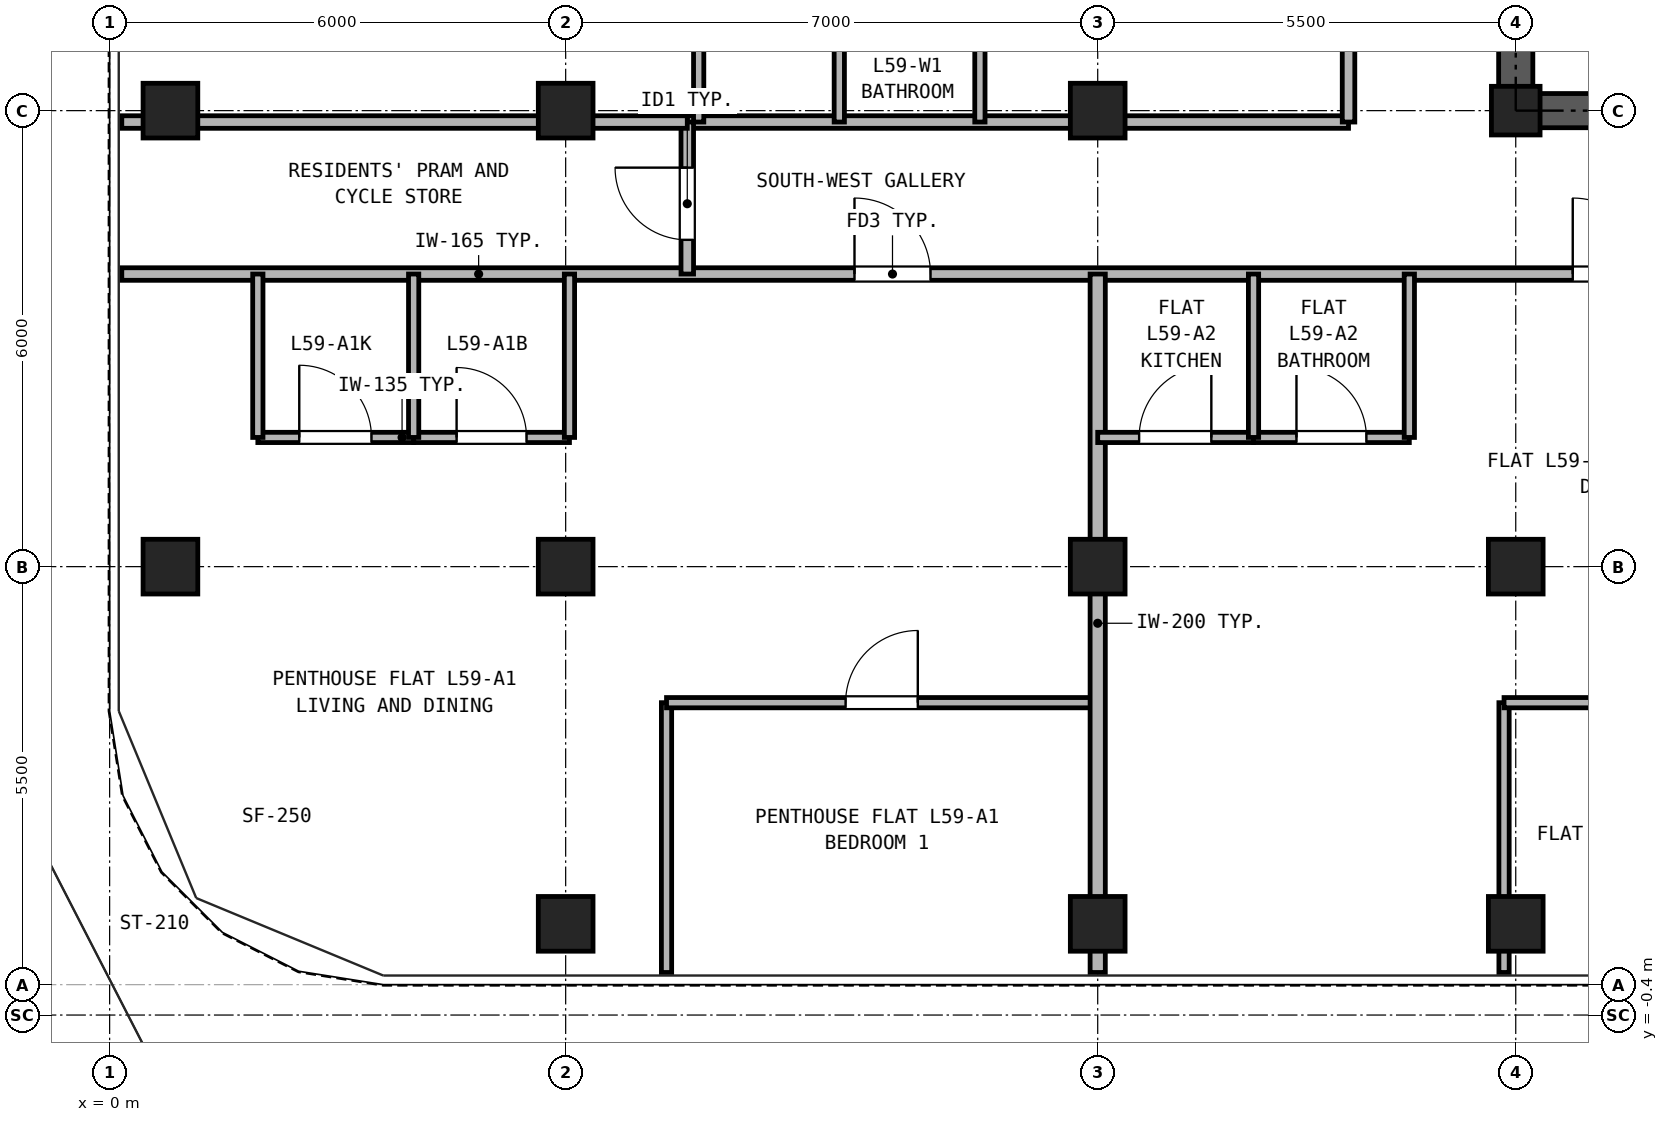
"""IFC4 building model, lengths in metres.
Left out: names, types, materials, properties, quantities, classifications, styles, units other than length and angle.
Written with IfcOpenShell. Run it as: python <this file> out.ifc"""

import sys

from ifc_helpers import new_model, si_unit, direction, frame, frame_2d, origin, origin_2d, place, context, subcontext, project, spatial, rectangle, hollow_rectangle, extrude, source, transform, mapped, element, fill, save


model = new_model("IFC4")
c1 = context("Model", 3, precision=1e-05, world=origin(), true_north=direction((0.0, 1.0)))
c2 = subcontext(c1, "Body", "Model", "MODEL_VIEW")
j1 = project(units=[si_unit("LENGTHUNIT", "METRE"), si_unit("PLANEANGLEUNIT", "RADIAN")], contexts=[c1])
p1 = place(None, origin())
s1 = spatial("IfcSite", under=j1, at=p1, CompositionType="ELEMENT")
p2 = place(p1, origin())
s2 = spatial("IfcBuilding", under=s1, at=p2, CompositionType="ELEMENT")
p3 = place(p2, frame((0.0, 0.0, 209.2)))
s3 = spatial("IfcBuildingStorey", under=s2, at=p3, CompositionType="ELEMENT", Elevation=209.2)
m1 = source(origin(), c2, "Body", "SweptSolid", [
    extrude(hollow_rectangle(XDim=0.72, YDim=0.72, WallThickness=0.04, at=origin_2d()), origin(), (0.0, 0.0, 1.0), 2.95),
])
for number, where, z_axis, x_axis in (
    (1, (6.0, 0.8, 0.0), (0.0, 0.0, 1.0), (1.0, 0.0, 0.0)),
    (2, (13.0, 0.8, 0.0), (0.0, 0.0, 1.0), (1.0, 0.0, 0.0)),
    (3, (18.5, 0.8, 0.0), (0.0, 0.0, 1.0), (1.0, 0.0, 0.0)),
    (4, (0.8, 5.5, 0.0), (0.0, 0.0, 1.0), (1.0, 0.0, 0.0)),
    (5, (0.8, 11.5, 0.0), (0.0, 0.0, 1.0), (1.0, 0.0, 0.0)),
    (6, (6.0, 5.5, 0.0), (0.0, 0.0, 1.0), (1.0, 0.0, 0.0)),
    (7, (6.0, 11.5, 0.0), (0.0, 0.0, 1.0), (1.0, 0.0, 0.0)),
    (8, (13.0, 5.5, 0.0), (0.0, 0.0, 1.0), (1.0, 0.0, 0.0)),
    (9, (13.0, 11.5, 0.0), (0.0, 0.0, 1.0), (1.0, 0.0, 0.0)),
    (10, (18.5, 5.5, 0.0), (0.0, 0.0, 1.0), (1.0, 0.0, 0.0)),
):
    element("IfcColumn", number, at=place(p3, frame(where, z_axis=z_axis, x_axis=x_axis)), inside=s3, PredefinedType="COLUMN", context=c2, shape_type="MappedRepresentation", body=[
        mapped(m1, transform((0.0, 0.0, 0.0), x_axis=(1.0, 0.0, 0.0), y_axis=(0.0, 1.0, 0.0), z_axis=(0.0, 0.0, 1.0), scale=1.0)),
    ])
m2 = source(origin(), c2, "Body", "SweptSolid", [
    extrude(hollow_rectangle(XDim=0.64, YDim=0.64, WallThickness=0.035, at=origin_2d()), origin(), (0.0, 0.0, 1.0), 2.95),
])
p4 = place(p3, frame((18.5, 11.5, 0.0), z_axis=(0.0, 0.0, 1.0), x_axis=(1.0, 0.0, 0.0)))
e11 = element("IfcColumn", 11, at=p4, inside=s3, PredefinedType="COLUMN", context=c2, shape_type="MappedRepresentation", body=[
    mapped(m2, transform((0.0, 0.0, 0.0), x_axis=(1.0, 0.0, 0.0), y_axis=(0.0, 1.0, 0.0), z_axis=(0.0, 0.0, 1.0), scale=1.0)),
])
p5 = place(p3, frame((18.275, 11.5, 0.0), z_axis=(0.0, 0.0, 1.0), x_axis=(1.0, 0.0, 0.0)))
e12 = element("IfcWall", 12, at=p5, inside=s3, PredefinedType="SHEAR", context=c2, shape_type="SweptSolid", body=[
    extrude(rectangle(XDim=10.45, YDim=0.45, at=frame_2d((5.225, 0.0))), origin(), (0.0, 0.0, 1.0), 2.95),
])
p6 = place(p5, frame((1.825, 0.0, 0.0)))
e13 = element("IfcOpeningElement", 13, at=p6, cuts=e12, PredefinedType="OPENING", context=c2, shape_type="SweptSolid", body=[
    extrude(rectangle(XDim=0.95, YDim=2.15, at=frame_2d((0.475, 1.075))), frame((0.0, 0.235, 0.0), z_axis=(0.0, -1.0, 0.0), x_axis=(1.0, 0.0, 0.0)), (0.0, 0.0, 1.0), 0.47),
])
p7 = place(p5, frame((5.325, 0.0, 0.0)))
e14 = element("IfcOpeningElement", 14, at=p7, cuts=e12, PredefinedType="OPENING", context=c2, shape_type="SweptSolid", body=[
    extrude(rectangle(XDim=0.95, YDim=2.15, at=frame_2d((0.475, 1.075))), frame((0.0, 0.235, 0.0), z_axis=(0.0, -1.0, 0.0), x_axis=(1.0, 0.0, 0.0)), (0.0, 0.0, 1.0), 0.47),
])
p8 = place(p5, frame((8.225, 0.0, 0.0)))
e15 = element("IfcOpeningElement", 15, at=p8, cuts=e12, PredefinedType="OPENING", context=c2, shape_type="SweptSolid", body=[
    extrude(rectangle(XDim=1.1, YDim=2.25, at=frame_2d((0.55, 1.125))), frame((0.0, 0.235, 0.0), z_axis=(0.0, -1.0, 0.0), x_axis=(1.0, 0.0, 0.0)), (0.0, 0.0, 1.0), 0.47),
])
p9 = place(p3, frame((18.5, 11.725, 0.0), z_axis=(0.0, 0.0, 1.0), x_axis=(0.0, 1.0, 0.0)))
e16 = element("IfcWall", 16, at=p9, inside=s3, PredefinedType="SHEAR", context=c2, shape_type="SweptSolid", body=[
    extrude(rectangle(XDim=16.8, YDim=0.45, at=frame_2d((8.4, 0.0))), origin(), (0.0, 0.0, 1.0), 2.95),
])
p10 = place(p9, frame((7.425, 0.0, 0.0)))
e17 = element("IfcOpeningElement", 17, at=p10, cuts=e16, PredefinedType="OPENING", context=c2, shape_type="SweptSolid", body=[
    extrude(rectangle(XDim=1.15, YDim=2.2, at=frame_2d((0.575, 1.1))), frame((0.0, 0.235, 0.0), z_axis=(0.0, -1.0, 0.0), x_axis=(1.0, 0.0, 0.0)), (0.0, 0.0, 1.0), 0.47),
])
p11 = place(p3, frame((0.16, 9.35, 0.0), z_axis=(0.0, 0.0, 1.0), x_axis=(1.0, 0.0, 0.0)))
e18 = element("IfcWall", 18, at=p11, inside=s3, PredefinedType="PARTITIONING", context=c2, shape_type="SweptSolid", body=[
    extrude(rectangle(XDim=41.48, YDim=0.165, at=frame_2d((20.74, 0.0))), origin(), (0.0, 0.0, 1.0), 2.95),
])
p12 = place(p11, frame((9.64, 0.0, 0.0)))
e19 = element("IfcOpeningElement", 19, at=p12, cuts=e18, PredefinedType="OPENING", context=c2, shape_type="SweptSolid", body=[
    extrude(rectangle(XDim=1.0, YDim=2.15, at=frame_2d((0.5, 1.075))), frame((0.0, 0.093, 0.0), z_axis=(0.0, -1.0, 0.0), x_axis=(1.0, 0.0, 0.0)), (0.0, 0.0, 1.0), 0.185),
])
p13 = place(p11, frame((19.09, 0.0, 0.0)))
e20 = element("IfcOpeningElement", 20, at=p13, cuts=e18, PredefinedType="OPENING", context=c2, shape_type="SweptSolid", body=[
    extrude(rectangle(XDim=1.0, YDim=2.15, at=frame_2d((0.5, 1.075))), frame((0.0, 0.093, 0.0), z_axis=(0.0, -1.0, 0.0), x_axis=(1.0, 0.0, 0.0)), (0.0, 0.0, 1.0), 0.185),
])
p14 = place(p11, frame((28.34, 0.0, 0.0)))
e21 = element("IfcOpeningElement", 21, at=p14, cuts=e18, PredefinedType="OPENING", context=c2, shape_type="SweptSolid", body=[
    extrude(rectangle(XDim=1.0, YDim=2.15, at=frame_2d((0.5, 1.075))), frame((0.0, 0.093, 0.0), z_axis=(0.0, -1.0, 0.0), x_axis=(1.0, 0.0, 0.0)), (0.0, 0.0, 1.0), 0.185),
])
p15 = place(p11, frame((32.865, 0.0, 0.0)))
e22 = element("IfcOpeningElement", 22, at=p15, cuts=e18, PredefinedType="OPENING", context=c2, shape_type="SweptSolid", body=[
    extrude(rectangle(XDim=1.0, YDim=2.15, at=frame_2d((0.5, 1.075))), frame((0.0, 0.093, 0.0), z_axis=(0.0, -1.0, 0.0), x_axis=(1.0, 0.0, 0.0)), (0.0, 0.0, 1.0), 0.185),
])
p16 = place(p3, frame((7.6, 11.35, 0.0), z_axis=(0.0, 0.0, 1.0), x_axis=(1.0, 0.0, 0.0)))
e23 = element("IfcWall", 23, at=p16, inside=s3, PredefinedType="PARTITIONING", context=c2, shape_type="SweptSolid", body=[
    extrude(rectangle(XDim=8.7, YDim=0.165, at=frame_2d((4.35, 0.0))), origin(), (0.0, 0.0, 1.0), 2.323),
])
p17 = place(p3, frame((7.6, 9.35, 0.0), z_axis=(0.0, 0.0, 1.0), x_axis=(0.0, 1.0, 0.0)))
e24 = element("IfcWall", 24, at=p17, inside=s3, PredefinedType="PARTITIONING", context=c2, shape_type="SweptSolid", body=[
    extrude(rectangle(XDim=2.0, YDim=0.165, at=frame_2d((1.0, 0.0))), origin(), (0.0, 0.0, 1.0), 2.95),
])
p18 = place(p17, frame((0.45, 0.0, 0.0)))
e25 = element("IfcOpeningElement", 25, at=p18, cuts=e24, PredefinedType="OPENING", context=c2, shape_type="SweptSolid", body=[
    extrude(rectangle(XDim=0.95, YDim=2.15, at=frame_2d((0.475, 1.075))), frame((0.0, 0.093, 0.0), z_axis=(0.0, -1.0, 0.0), x_axis=(1.0, 0.0, 0.0)), (0.0, 0.0, 1.0), 0.185),
])
p19 = place(p3, frame((16.3, 11.35, 0.0), z_axis=(0.0, 0.0, 1.0), x_axis=(0.0, 1.0, 0.0)))
e26 = element("IfcWall", 26, at=p19, inside=s3, PredefinedType="PARTITIONING", context=c2, shape_type="SweptSolid", body=[
    extrude(rectangle(XDim=23.79, YDim=0.165, at=frame_2d((11.895, 0.0))), origin(), (0.0, 0.0, 1.0), 2.95),
])
p20 = place(p19, frame((4.825, 0.0, 0.0)))
e27 = element("IfcOpeningElement", 27, at=p20, cuts=e26, PredefinedType="OPENING", context=c2, shape_type="SweptSolid", body=[
    extrude(rectangle(XDim=1.0, YDim=2.15, at=frame_2d((0.5, 1.075))), frame((0.0, 0.093, 0.0), z_axis=(0.0, -1.0, 0.0), x_axis=(1.0, 0.0, 0.0)), (0.0, 0.0, 1.0), 0.185),
])
p21 = place(p19, frame((14.475, 0.0, 0.0)))
e28 = element("IfcOpeningElement", 28, at=p21, cuts=e26, PredefinedType="OPENING", context=c2, shape_type="SweptSolid", body=[
    extrude(rectangle(XDim=1.0, YDim=2.15, at=frame_2d((0.5, 1.075))), frame((0.0, 0.093, 0.0), z_axis=(0.0, -1.0, 0.0), x_axis=(1.0, 0.0, 0.0)), (0.0, 0.0, 1.0), 0.185),
])
p22 = place(p3, frame((1.95, 7.2, 0.0), z_axis=(0.0, 0.0, 1.0), x_axis=(1.0, 0.0, 0.0)))
e29 = element("IfcWall", 29, at=p22, inside=s3, PredefinedType="PARTITIONING", context=c2, shape_type="SweptSolid", body=[
    extrude(rectangle(XDim=2.05, YDim=0.135, at=frame_2d((1.025, 0.0))), origin(), (0.0, 0.0, 1.0), 2.95),
])
p23 = place(p22, frame((0.545, 0.0, 0.0)))
e30 = element("IfcOpeningElement", 30, at=p23, cuts=e29, PredefinedType="OPENING", context=c2, shape_type="SweptSolid", body=[
    extrude(rectangle(XDim=0.95, YDim=2.15, at=frame_2d((0.475, 1.075))), frame((0.0, 0.077, 0.0), z_axis=(0.0, -1.0, 0.0), x_axis=(1.0, 0.0, 0.0)), (0.0, 0.0, 1.0), 0.155),
])
p24 = place(p3, frame((4.0, 7.2, 0.0), z_axis=(0.0, 0.0, 1.0), x_axis=(1.0, 0.0, 0.0)))
e31 = element("IfcWall", 31, at=p24, inside=s3, PredefinedType="PARTITIONING", context=c2, shape_type="SweptSolid", body=[
    extrude(rectangle(XDim=2.05, YDim=0.135, at=frame_2d((1.025, 0.0))), origin(), (0.0, 0.0, 1.0), 2.95),
])
p25 = place(p24, frame((0.565, 0.0, 0.0)))
e32 = element("IfcOpeningElement", 32, at=p25, cuts=e31, PredefinedType="OPENING", context=c2, shape_type="SweptSolid", body=[
    extrude(rectangle(XDim=0.92, YDim=2.1, at=frame_2d((0.46, 1.05))), frame((0.0, 0.077, 0.0), z_axis=(0.0, -1.0, 0.0), x_axis=(1.0, 0.0, 0.0)), (0.0, 0.0, 1.0), 0.155),
])
for number, where, z_axis, x_axis in (
    (33, (1.95, 7.2, 0.0), (0.0, 0.0, 1.0), (0.0, 1.0, 0.0)),
    (34, (4.0, 7.2, 0.0), (0.0, 0.0, 1.0), (0.0, 1.0, 0.0)),
):
    element("IfcWall", number, at=place(p3, frame(where, z_axis=z_axis, x_axis=x_axis)), inside=s3, PredefinedType="PARTITIONING", context=c2, shape_type="SweptSolid", body=[
        extrude(rectangle(XDim=2.15, YDim=0.135, at=frame_2d((1.075, 0.0))), origin(), (0.0, 0.0, 1.0), 2.95),
    ])
p26 = place(p3, frame((6.05, 7.2, 0.0), z_axis=(0.0, 0.0, 1.0), x_axis=(0.0, 1.0, 0.0)))
e35 = element("IfcWall", 35, at=p26, inside=s3, PredefinedType="PARTITIONING", context=c2, shape_type="SweptSolid", body=[
    extrude(rectangle(XDim=2.15, YDim=0.135, at=frame_2d((1.075, 0.0))), origin(), (0.0, 0.0, 1.0), 2.323),
])
p27 = place(p3, frame((7.327, 0.16, 0.0), z_axis=(0.0, 0.0, 1.0), x_axis=(0.0, 1.0, 0.0)))
e36 = element("IfcWall", 36, at=p27, inside=s3, PredefinedType="PARTITIONING", context=c2, shape_type="SweptSolid", body=[
    extrude(rectangle(XDim=3.55, YDim=0.135, at=frame_2d((1.775, 0.0))), origin(), (0.0, 0.0, 1.0), 2.95),
])
p28 = place(p3, frame((7.327, 3.71, 0.0), z_axis=(0.0, 0.0, 1.0), x_axis=(1.0, 0.0, 0.0)))
e37 = element("IfcWall", 37, at=p28, inside=s3, PredefinedType="PARTITIONING", context=c2, shape_type="SweptSolid", body=[
    extrude(rectangle(XDim=5.673, YDim=0.135, at=frame_2d((2.836, 0.0))), origin(), (0.0, 0.0, 1.0), 2.95),
])
p29 = place(p28, frame((2.356, 0.0, 0.0)))
e38 = element("IfcOpeningElement", 38, at=p29, cuts=e37, PredefinedType="OPENING", context=c2, shape_type="SweptSolid", body=[
    extrude(rectangle(XDim=0.95, YDim=2.15, at=frame_2d((0.475, 1.075))), frame((0.0, 0.077, 0.0), z_axis=(0.0, -1.0, 0.0), x_axis=(1.0, 0.0, 0.0)), (0.0, 0.0, 1.0), 0.155),
])
p30 = place(p3, frame((13.0, 0.16, 0.0), z_axis=(0.0, 0.0, 1.0), x_axis=(0.0, 1.0, 0.0)))
e39 = element("IfcWall", 39, at=p30, inside=s3, PredefinedType="PARTITIONING", context=c2, shape_type="SweptSolid", body=[
    extrude(rectangle(XDim=9.19, YDim=0.2, at=frame_2d((4.595, 0.0))), origin(), (0.0, 0.0, 1.0), 2.323),
])
p31 = place(p3, frame((13.0, 7.2, 0.0), z_axis=(0.0, 0.0, 1.0), x_axis=(1.0, 0.0, 0.0)))
e40 = element("IfcWall", 40, at=p31, inside=s3, PredefinedType="PARTITIONING", context=c2, shape_type="SweptSolid", body=[
    extrude(rectangle(XDim=2.05, YDim=0.135, at=frame_2d((1.025, 0.0))), origin(), (0.0, 0.0, 1.0), 2.95),
])
p32 = place(p31, frame((0.545, 0.0, 0.0)))
e41 = element("IfcOpeningElement", 41, at=p32, cuts=e40, PredefinedType="OPENING", context=c2, shape_type="SweptSolid", body=[
    extrude(rectangle(XDim=0.95, YDim=2.15, at=frame_2d((0.475, 1.075))), frame((0.0, 0.077, 0.0), z_axis=(0.0, -1.0, 0.0), x_axis=(1.0, 0.0, 0.0)), (0.0, 0.0, 1.0), 0.155),
])
p33 = place(p3, frame((15.05, 7.2, 0.0), z_axis=(0.0, 0.0, 1.0), x_axis=(1.0, 0.0, 0.0)))
e42 = element("IfcWall", 42, at=p33, inside=s3, PredefinedType="PARTITIONING", context=c2, shape_type="SweptSolid", body=[
    extrude(rectangle(XDim=2.05, YDim=0.135, at=frame_2d((1.025, 0.0))), origin(), (0.0, 0.0, 1.0), 2.95),
])
p34 = place(p33, frame((0.565, 0.0, 0.0)))
e43 = element("IfcOpeningElement", 43, at=p34, cuts=e42, PredefinedType="OPENING", context=c2, shape_type="SweptSolid", body=[
    extrude(rectangle(XDim=0.92, YDim=2.1, at=frame_2d((0.46, 1.05))), frame((0.0, 0.077, 0.0), z_axis=(0.0, -1.0, 0.0), x_axis=(1.0, 0.0, 0.0)), (0.0, 0.0, 1.0), 0.155),
])
for number, where, z_axis, x_axis in (
    (44, (15.05, 7.2, 0.0), (0.0, 0.0, 1.0), (0.0, 1.0, 0.0)),
    (45, (17.1, 7.2, 0.0), (0.0, 0.0, 1.0), (0.0, 1.0, 0.0)),
):
    element("IfcWall", number, at=place(p3, frame(where, z_axis=z_axis, x_axis=x_axis)), inside=s3, PredefinedType="PARTITIONING", context=c2, shape_type="SweptSolid", body=[
        extrude(rectangle(XDim=2.15, YDim=0.135, at=frame_2d((1.075, 0.0))), origin(), (0.0, 0.0, 1.0), 2.95),
    ])
p35 = place(p3, frame((18.346, 0.16, 0.0), z_axis=(0.0, 0.0, 1.0), x_axis=(0.0, 1.0, 0.0)))
e46 = element("IfcWall", 46, at=p35, inside=s3, PredefinedType="PARTITIONING", context=c2, shape_type="SweptSolid", body=[
    extrude(rectangle(XDim=3.55, YDim=0.135, at=frame_2d((1.775, 0.0))), origin(), (0.0, 0.0, 1.0), 2.323),
])
p36 = place(p3, frame((18.346, 3.71, 0.0), z_axis=(0.0, 0.0, 1.0), x_axis=(1.0, 0.0, 0.0)))
e47 = element("IfcWall", 47, at=p36, inside=s3, PredefinedType="PARTITIONING", context=c2, shape_type="SweptSolid", body=[
    extrude(rectangle(XDim=4.154, YDim=0.135, at=frame_2d((2.077, 0.0))), origin(), (0.0, 0.0, 1.0), 2.95),
])
p37 = place(p36, frame((1.597, 0.0, 0.0)))
e48 = element("IfcOpeningElement", 48, at=p37, cuts=e47, PredefinedType="OPENING", context=c2, shape_type="SweptSolid", body=[
    extrude(rectangle(XDim=0.95, YDim=2.15, at=frame_2d((0.475, 1.075))), frame((0.0, 0.077, 0.0), z_axis=(0.0, -1.0, 0.0), x_axis=(1.0, 0.0, 0.0)), (0.0, 0.0, 1.0), 0.155),
])
p38 = place(p3, frame((0.16, 11.35, 0.0), z_axis=(0.0, 0.0, 1.0), x_axis=(1.0, 0.0, 0.0)))
e49 = element("IfcWall", 49, at=p38, inside=s3, PredefinedType="PARTITIONING", context=c2, shape_type="SweptSolid", body=[
    extrude(rectangle(XDim=7.44, YDim=0.165, at=frame_2d((3.72, 0.0))), origin(), (0.0, 0.0, 1.0), 2.323),
])
for number, where, z_axis, x_axis in (
    (50, (7.75, 11.35, 0.0), (0.0, 0.0, 1.0), (0.0, 1.0, 0.0)),
    (51, (9.6, 11.35, 0.0), (0.0, 0.0, 1.0), (0.0, 1.0, 0.0)),
    (52, (11.45, 11.35, 0.0), (0.0, 0.0, 1.0), (0.0, 1.0, 0.0)),
):
    element("IfcWall", number, at=place(p3, frame(where, z_axis=z_axis, x_axis=x_axis)), inside=s3, PredefinedType="PARTITIONING", context=c2, shape_type="SweptSolid", body=[
        extrude(rectangle(XDim=2.15, YDim=0.135, at=frame_2d((1.075, 0.0))), origin(), (0.0, 0.0, 1.0), 2.95),
    ])
p39 = place(p23, origin())
e53 = element("IfcDoor", 53, at=p39, inside=s3, OperationType="SINGLE_SWING_LEFT", PredefinedType="DOOR", context=c2, shape_type="SweptSolid", body=[
    extrude(rectangle(XDim=0.95, YDim=2.15, at=frame_2d((0.475, 1.075))), frame((0.0, 0.025, 0.0), z_axis=(0.0, -1.0, 0.0), x_axis=(1.0, 0.0, 0.0)), (0.0, 0.0, 1.0), 0.05),
])
fill(e30, e53)
p40 = place(p25, origin())
e54 = element("IfcDoor", 54, at=p40, inside=s3, OperationType="SINGLE_SWING_LEFT", PredefinedType="DOOR", context=c2, shape_type="SweptSolid", body=[
    extrude(rectangle(XDim=0.92, YDim=2.1, at=frame_2d((0.46, 1.05))), frame((0.0, 0.025, 0.0), z_axis=(0.0, -1.0, 0.0), x_axis=(1.0, 0.0, 0.0)), (0.0, 0.0, 1.0), 0.05),
])
fill(e32, e54)
p41 = place(p29, frame((0.95, 0.0, 0.0), z_axis=(0.0, 0.0, 1.0), x_axis=(-1.0, 0.0, 0.0)))
e55 = element("IfcDoor", 55, at=p41, inside=s3, OperationType="SINGLE_SWING_RIGHT", PredefinedType="DOOR", context=c2, shape_type="SweptSolid", body=[
    extrude(rectangle(XDim=0.95, YDim=2.15, at=frame_2d((0.475, 1.075))), frame((0.0, 0.025, 0.0), z_axis=(0.0, -1.0, 0.0), x_axis=(1.0, 0.0, 0.0)), (0.0, 0.0, 1.0), 0.05),
])
fill(e38, e55)
p42 = place(p12, frame((1.0, 0.0, 0.0), z_axis=(0.0, 0.0, 1.0), x_axis=(-1.0, 0.0, 0.0)))
e56 = element("IfcDoor", 56, at=p42, inside=s3, OperationType="SINGLE_SWING_LEFT", PredefinedType="DOOR", context=c2, shape_type="SweptSolid", body=[
    extrude(rectangle(XDim=1.0, YDim=2.15, at=frame_2d((0.5, 1.075))), frame((0.0, 0.025, 0.0), z_axis=(0.0, -1.0, 0.0), x_axis=(1.0, 0.0, 0.0)), (0.0, 0.0, 1.0), 0.05),
])
fill(e19, e56)
p43 = place(p32, origin())
e57 = element("IfcDoor", 57, at=p43, inside=s3, OperationType="SINGLE_SWING_RIGHT", PredefinedType="DOOR", context=c2, shape_type="SweptSolid", body=[
    extrude(rectangle(XDim=0.95, YDim=2.15, at=frame_2d((0.475, 1.075))), frame((0.0, 0.025, 0.0), z_axis=(0.0, -1.0, 0.0), x_axis=(1.0, 0.0, 0.0)), (0.0, 0.0, 1.0), 0.05),
])
fill(e41, e57)
p44 = place(p34, origin())
e58 = element("IfcDoor", 58, at=p44, inside=s3, OperationType="SINGLE_SWING_LEFT", PredefinedType="DOOR", context=c2, shape_type="SweptSolid", body=[
    extrude(rectangle(XDim=0.92, YDim=2.1, at=frame_2d((0.46, 1.05))), frame((0.0, 0.025, 0.0), z_axis=(0.0, -1.0, 0.0), x_axis=(1.0, 0.0, 0.0)), (0.0, 0.0, 1.0), 0.05),
])
fill(e43, e58)
p45 = place(p13, frame((1.0, 0.0, 0.0), z_axis=(0.0, 0.0, 1.0), x_axis=(-1.0, 0.0, 0.0)))
e59 = element("IfcDoor", 59, at=p45, inside=s3, OperationType="SINGLE_SWING_LEFT", PredefinedType="DOOR", context=c2, shape_type="SweptSolid", body=[
    extrude(rectangle(XDim=1.0, YDim=2.15, at=frame_2d((0.5, 1.075))), frame((0.0, 0.025, 0.0), z_axis=(0.0, -1.0, 0.0), x_axis=(1.0, 0.0, 0.0)), (0.0, 0.0, 1.0), 0.05),
])
fill(e20, e59)
p46 = place(p18, frame((0.95, 0.0, 0.0), z_axis=(0.0, 0.0, 1.0), x_axis=(-1.0, 0.0, 0.0)))
e60 = element("IfcDoor", 60, at=p46, inside=s3, OperationType="SINGLE_SWING_RIGHT", PredefinedType="DOOR", context=c2, shape_type="SweptSolid", body=[
    extrude(rectangle(XDim=0.95, YDim=2.15, at=frame_2d((0.475, 1.075))), frame((0.0, 0.025, 0.0), z_axis=(0.0, -1.0, 0.0), x_axis=(1.0, 0.0, 0.0)), (0.0, 0.0, 1.0), 0.05),
])
fill(e25, e60)
save(model, sys.argv[1])
